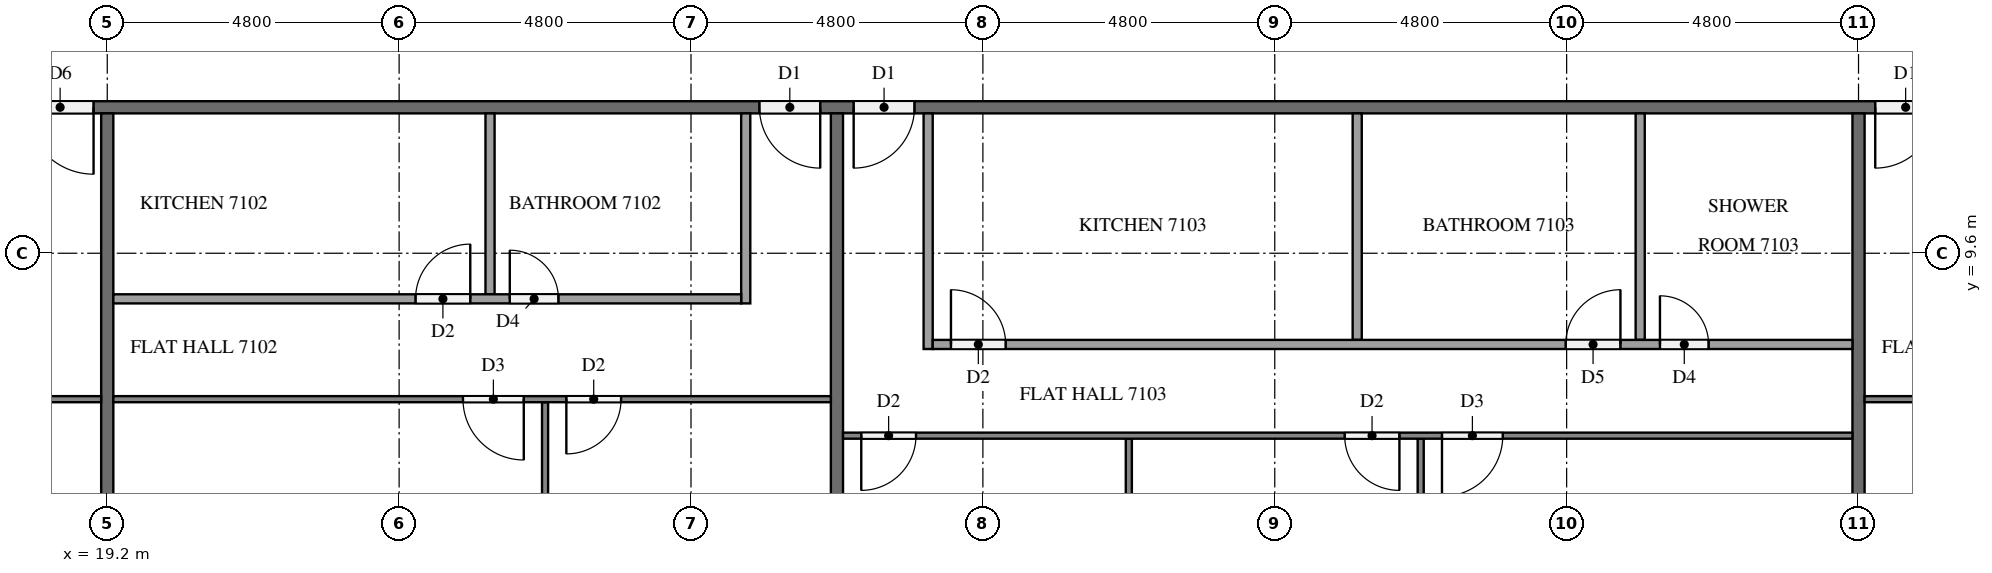
"""IFC4 building model, lengths in metres.
Left out: names, types, materials, properties, quantities, classifications, styles, units other than length and angle.
Written with IfcOpenShell. Run it as: python <this file> out.ifc"""

import sys

from ifc_helpers import new_model, si_unit, direction, frame, frame_2d, origin, place, context, subcontext, project, spatial, rectangle, extrude, element, fill, save


model = new_model("IFC4")
c1 = context("Model", 3, precision=1e-05, world=origin(), true_north=direction((0.0, 1.0)))
c2 = subcontext(c1, "Body", "Model", "MODEL_VIEW")
j1 = project(units=[si_unit("LENGTHUNIT", "METRE"), si_unit("PLANEANGLEUNIT", "RADIAN")], contexts=[c1])
p1 = place(None, origin())
s1 = spatial("IfcSite", under=j1, at=p1, CompositionType="ELEMENT")
p2 = place(p1, origin())
s2 = spatial("IfcBuilding", under=s1, at=p2, CompositionType="ELEMENT")
p3 = place(p2, frame((0.0, 0.0, 272.1)))
s3 = spatial("IfcBuildingStorey", under=s2, at=p3, CompositionType="ELEMENT", Elevation=272.1)
p4 = place(p3, frame((50.5, 12.0, 0.0), z_axis=(0.0, 0.0, 1.0), x_axis=(-1.0, 0.0, 0.0)))
e1 = element("IfcWall", 1, at=p4, inside=s3, PredefinedType="PARTITIONING", context=c2, shape_type="SweptSolid", body=[
    extrude(rectangle(XDim=38.6, YDim=0.2, at=frame_2d((19.3, 0.0))), origin(), (0.0, 0.0, 1.0), 3.2),
])
p5 = place(p4, frame((31.525, 0.0, 0.0)))
e2 = element("IfcOpeningElement", 2, at=p5, cuts=e1, PredefinedType="OPENING", context=c2, shape_type="SweptSolid", body=[
    extrude(rectangle(XDim=1.1, YDim=2.1, at=frame_2d((0.55, 1.05))), frame((0.0, 0.11, 0.0), z_axis=(0.0, -1.0, 0.0), x_axis=(1.0, 0.0, 0.0)), (0.0, 0.0, 1.0), 0.22),
])
p6 = place(p4, frame((19.575, 0.0, 0.0)))
e3 = element("IfcOpeningElement", 3, at=p6, cuts=e1, PredefinedType="OPENING", context=c2, shape_type="SweptSolid", body=[
    extrude(rectangle(XDim=1.0, YDim=2.1, at=frame_2d((0.5, 1.05))), frame((0.0, 0.11, 0.0), z_axis=(0.0, -1.0, 0.0), x_axis=(1.0, 0.0, 0.0)), (0.0, 0.0, 1.0), 0.22),
])
p7 = place(p4, frame((18.025, 0.0, 0.0)))
e4 = element("IfcOpeningElement", 4, at=p7, cuts=e1, PredefinedType="OPENING", context=c2, shape_type="SweptSolid", body=[
    extrude(rectangle(XDim=1.0, YDim=2.1, at=frame_2d((0.5, 1.05))), frame((0.0, 0.11, 0.0), z_axis=(0.0, -1.0, 0.0), x_axis=(1.0, 0.0, 0.0)), (0.0, 0.0, 1.0), 0.22),
])
p8 = place(p4, frame((1.225, 0.0, 0.0)))
e5 = element("IfcOpeningElement", 5, at=p8, cuts=e1, PredefinedType="OPENING", context=c2, shape_type="SweptSolid", body=[
    extrude(rectangle(XDim=1.0, YDim=2.1, at=frame_2d((0.5, 1.05))), frame((0.0, 0.11, 0.0), z_axis=(0.0, -1.0, 0.0), x_axis=(1.0, 0.0, 0.0)), (0.0, 0.0, 1.0), 0.22),
])
for number, where, z_axis, x_axis in (
    (6, (19.2, 11.9, 0.0), (0.0, 0.0, 1.0), (0.0, -1.0, 0.0)),
    (7, (31.2, 11.9, 0.0), (0.0, 0.0, 1.0), (0.0, -1.0, 0.0)),
    (8, (48.0, 11.9, 0.0), (0.0, 0.0, 1.0), (0.0, -1.0, 0.0)),
):
    element("IfcWall", number, at=place(p3, frame(where, z_axis=z_axis, x_axis=x_axis)), inside=s3, PredefinedType="PARTITIONING", context=c2, shape_type="SweptSolid", body=[
        extrude(rectangle(XDim=11.8, YDim=0.2, at=frame_2d((5.9, 0.0))), origin(), (0.0, 0.0, 1.0), 3.2),
    ])
p9 = place(p3, frame((19.1, 7.2, 0.0), z_axis=(0.0, 0.0, 1.0), x_axis=(-1.0, 0.0, 0.0)))
e9 = element("IfcWall", 9, at=p9, inside=s3, PredefinedType="PARTITIONING", context=c2, shape_type="SweptSolid", body=[
    extrude(rectangle(XDim=19.0, YDim=0.1, at=frame_2d((9.5, 0.0))), origin(), (0.0, 0.0, 1.0), 3.2),
])
p10 = place(p9, frame((3.45, 0.0, 0.0)))
e10 = element("IfcOpeningElement", 10, at=p10, cuts=e9, PredefinedType="OPENING", context=c2, shape_type="SweptSolid", body=[
    extrude(rectangle(XDim=0.9, YDim=2.1, at=frame_2d((0.45, 1.05))), frame((0.0, 0.06, 0.0), z_axis=(0.0, -1.0, 0.0), x_axis=(1.0, 0.0, 0.0)), (0.0, 0.0, 1.0), 0.12),
])
p11 = place(p9, frame((5.05, 0.0, 0.0)))
e11 = element("IfcOpeningElement", 11, at=p11, cuts=e9, PredefinedType="OPENING", context=c2, shape_type="SweptSolid", body=[
    extrude(rectangle(XDim=0.9, YDim=2.1, at=frame_2d((0.45, 1.05))), frame((0.0, 0.06, 0.0), z_axis=(0.0, -1.0, 0.0), x_axis=(1.0, 0.0, 0.0)), (0.0, 0.0, 1.0), 0.12),
])
p12 = place(p9, frame((13.05, 0.0, 0.0)))
e12 = element("IfcOpeningElement", 12, at=p12, cuts=e9, PredefinedType="OPENING", context=c2, shape_type="SweptSolid", body=[
    extrude(rectangle(XDim=0.9, YDim=2.1, at=frame_2d((0.45, 1.05))), frame((0.0, 0.06, 0.0), z_axis=(0.0, -1.0, 0.0), x_axis=(1.0, 0.0, 0.0)), (0.0, 0.0, 1.0), 0.12),
])
p13 = place(p9, frame((14.65, 0.0, 0.0)))
e13 = element("IfcOpeningElement", 13, at=p13, cuts=e9, PredefinedType="OPENING", context=c2, shape_type="SweptSolid", body=[
    extrude(rectangle(XDim=1.0, YDim=2.1, at=frame_2d((0.5, 1.05))), frame((0.0, 0.06, 0.0), z_axis=(0.0, -1.0, 0.0), x_axis=(1.0, 0.0, 0.0)), (0.0, 0.0, 1.0), 0.12),
])
p14 = place(p3, frame((26.4, 7.15, 0.0), z_axis=(0.0, 0.0, 1.0), x_axis=(0.0, -1.0, 0.0)))
e14 = element("IfcWall", 14, at=p14, inside=s3, PredefinedType="PARTITIONING", context=c2, shape_type="SweptSolid", body=[
    extrude(rectangle(XDim=7.05, YDim=0.1, at=frame_2d((3.525, 0.0))), origin(), (0.0, 0.0, 1.0), 3.2),
])
p15 = place(p3, frame((31.1, 7.2, 0.0), z_axis=(0.0, 0.0, 1.0), x_axis=(-1.0, 0.0, 0.0)))
e15 = element("IfcWall", 15, at=p15, inside=s3, PredefinedType="PARTITIONING", context=c2, shape_type="SweptSolid", body=[
    extrude(rectangle(XDim=11.8, YDim=0.1, at=frame_2d((5.9, 0.0))), origin(), (0.0, 0.0, 1.0), 3.2),
])
p16 = place(p15, frame((3.45, 0.0, 0.0)))
e16 = element("IfcOpeningElement", 16, at=p16, cuts=e15, PredefinedType="OPENING", context=c2, shape_type="SweptSolid", body=[
    extrude(rectangle(XDim=0.9, YDim=2.1, at=frame_2d((0.45, 1.05))), frame((0.0, 0.06, 0.0), z_axis=(0.0, -1.0, 0.0), x_axis=(1.0, 0.0, 0.0)), (0.0, 0.0, 1.0), 0.12),
])
p17 = place(p15, frame((5.05, 0.0, 0.0)))
e17 = element("IfcOpeningElement", 17, at=p17, cuts=e15, PredefinedType="OPENING", context=c2, shape_type="SweptSolid", body=[
    extrude(rectangle(XDim=1.0, YDim=2.1, at=frame_2d((0.5, 1.05))), frame((0.0, 0.06, 0.0), z_axis=(0.0, -1.0, 0.0), x_axis=(1.0, 0.0, 0.0)), (0.0, 0.0, 1.0), 0.12),
])
p18 = place(p3, frame((25.495, 11.9, 0.0), z_axis=(0.0, 0.0, 1.0), x_axis=(0.0, -1.0, 0.0)))
e18 = element("IfcWall", 18, at=p18, inside=s3, PredefinedType="PARTITIONING", context=c2, shape_type="SweptSolid", body=[
    extrude(rectangle(XDim=2.975, YDim=0.15, at=frame_2d((1.487, 0.0))), origin(), (0.0, 0.0, 1.0), 3.2),
])
p19 = place(p3, frame((29.7, 11.9, 0.0), z_axis=(0.0, 0.0, 1.0), x_axis=(0.0, -1.0, 0.0)))
e19 = element("IfcWall", 19, at=p19, inside=s3, PredefinedType="PARTITIONING", context=c2, shape_type="SweptSolid", body=[
    extrude(rectangle(XDim=3.125, YDim=0.15, at=frame_2d((1.562, 0.0))), origin(), (0.0, 0.0, 1.0), 3.2),
])
p20 = place(p3, frame((19.3, 8.85, 0.0), z_axis=(0.0, 0.0, 1.0), x_axis=(1.0, 0.0, 0.0)))
e20 = element("IfcWall", 20, at=p20, inside=s3, PredefinedType="PARTITIONING", context=c2, shape_type="SweptSolid", body=[
    extrude(rectangle(XDim=10.325, YDim=0.15, at=frame_2d((5.163, 0.0))), origin(), (0.0, 0.0, 1.0), 3.2),
])
p21 = place(p20, frame((6.52, 0.0, 0.0)))
e21 = element("IfcOpeningElement", 21, at=p21, cuts=e20, PredefinedType="OPENING", context=c2, shape_type="SweptSolid", body=[
    extrude(rectangle(XDim=0.8, YDim=2.1, at=frame_2d((0.4, 1.05))), frame((0.0, 0.085, 0.0), z_axis=(0.0, -1.0, 0.0), x_axis=(1.0, 0.0, 0.0)), (0.0, 0.0, 1.0), 0.17),
])
p22 = place(p20, frame((4.97, 0.0, 0.0)))
e22 = element("IfcOpeningElement", 22, at=p22, cuts=e20, PredefinedType="OPENING", context=c2, shape_type="SweptSolid", body=[
    extrude(rectangle(XDim=0.9, YDim=2.1, at=frame_2d((0.45, 1.05))), frame((0.0, 0.085, 0.0), z_axis=(0.0, -1.0, 0.0), x_axis=(1.0, 0.0, 0.0)), (0.0, 0.0, 1.0), 0.17),
])
for number, where, z_axis, x_axis in (
    (23, (36.0, 6.55, 0.0), (0.0, 0.0, 1.0), (0.0, -1.0, 0.0)),
    (24, (40.8, 6.55, 0.0), (0.0, 0.0, 1.0), (0.0, -1.0, 0.0)),
):
    element("IfcWall", number, at=place(p3, frame(where, z_axis=z_axis, x_axis=x_axis)), inside=s3, PredefinedType="PARTITIONING", context=c2, shape_type="SweptSolid", body=[
        extrude(rectangle(XDim=6.45, YDim=0.1, at=frame_2d((3.225, 0.0))), origin(), (0.0, 0.0, 1.0), 3.2),
    ])
p23 = place(p3, frame((47.9, 6.6, 0.0), z_axis=(0.0, 0.0, 1.0), x_axis=(-1.0, 0.0, 0.0)))
e25 = element("IfcWall", 25, at=p23, inside=s3, PredefinedType="PARTITIONING", context=c2, shape_type="SweptSolid", body=[
    extrude(rectangle(XDim=16.6, YDim=0.1, at=frame_2d((8.3, 0.0))), origin(), (0.0, 0.0, 1.0), 3.2),
])
p24 = place(p23, frame((15.4, 0.0, 0.0)))
e26 = element("IfcOpeningElement", 26, at=p24, cuts=e25, PredefinedType="OPENING", context=c2, shape_type="SweptSolid", body=[
    extrude(rectangle(XDim=0.9, YDim=2.1, at=frame_2d((0.45, 1.05))), frame((0.0, 0.06, 0.0), z_axis=(0.0, -1.0, 0.0), x_axis=(1.0, 0.0, 0.0)), (0.0, 0.0, 1.0), 0.12),
])
p25 = place(p23, frame((7.45, 0.0, 0.0)))
e27 = element("IfcOpeningElement", 27, at=p25, cuts=e25, PredefinedType="OPENING", context=c2, shape_type="SweptSolid", body=[
    extrude(rectangle(XDim=0.9, YDim=2.1, at=frame_2d((0.45, 1.05))), frame((0.0, 0.06, 0.0), z_axis=(0.0, -1.0, 0.0), x_axis=(1.0, 0.0, 0.0)), (0.0, 0.0, 1.0), 0.12),
])
p26 = place(p23, frame((5.75, 0.0, 0.0)))
e28 = element("IfcOpeningElement", 28, at=p26, cuts=e25, PredefinedType="OPENING", context=c2, shape_type="SweptSolid", body=[
    extrude(rectangle(XDim=1.0, YDim=2.1, at=frame_2d((0.5, 1.05))), frame((0.0, 0.06, 0.0), z_axis=(0.0, -1.0, 0.0), x_axis=(1.0, 0.0, 0.0)), (0.0, 0.0, 1.0), 0.12),
])
for number, where, z_axis, x_axis in (
    (29, (39.756, 11.9, 0.0), (0.0, 0.0, 1.0), (0.0, -1.0, 0.0)),
    (30, (44.41, 11.9, 0.0), (0.0, 0.0, 1.0), (0.0, -1.0, 0.0)),
):
    element("IfcWall", number, at=place(p3, frame(where, z_axis=z_axis, x_axis=x_axis)), inside=s3, PredefinedType="PARTITIONING", context=c2, shape_type="SweptSolid", body=[
        extrude(rectangle(XDim=3.725, YDim=0.15, at=frame_2d((1.862, 0.0))), origin(), (0.0, 0.0, 1.0), 3.2),
    ])
p27 = place(p3, frame((32.7, 11.9, 0.0), z_axis=(0.0, 0.0, 1.0), x_axis=(0.0, -1.0, 0.0)))
e31 = element("IfcWall", 31, at=p27, inside=s3, PredefinedType="PARTITIONING", context=c2, shape_type="SweptSolid", body=[
    extrude(rectangle(XDim=3.875, YDim=0.15, at=frame_2d((1.938, 0.0))), origin(), (0.0, 0.0, 1.0), 3.2),
])
p28 = place(p3, frame((32.775, 8.1, 0.0), z_axis=(0.0, 0.0, 1.0), x_axis=(1.0, 0.0, 0.0)))
e32 = element("IfcWall", 32, at=p28, inside=s3, PredefinedType="PARTITIONING", context=c2, shape_type="SweptSolid", body=[
    extrude(rectangle(XDim=15.125, YDim=0.15, at=frame_2d((7.562, 0.0))), origin(), (0.0, 0.0, 1.0), 3.2),
])
p29 = place(p28, frame((0.3, 0.0, 0.0)))
e33 = element("IfcOpeningElement", 33, at=p29, cuts=e32, PredefinedType="OPENING", context=c2, shape_type="SweptSolid", body=[
    extrude(rectangle(XDim=0.9, YDim=2.1, at=frame_2d((0.45, 1.05))), frame((0.0, 0.085, 0.0), z_axis=(0.0, -1.0, 0.0), x_axis=(1.0, 0.0, 0.0)), (0.0, 0.0, 1.0), 0.17),
])
p30 = place(p28, frame((10.41, 0.0, 0.0)))
e34 = element("IfcOpeningElement", 34, at=p30, cuts=e32, PredefinedType="OPENING", context=c2, shape_type="SweptSolid", body=[
    extrude(rectangle(XDim=0.9, YDim=2.1, at=frame_2d((0.45, 1.05))), frame((0.0, 0.085, 0.0), z_axis=(0.0, -1.0, 0.0), x_axis=(1.0, 0.0, 0.0)), (0.0, 0.0, 1.0), 0.17),
])
p31 = place(p28, frame((11.96, 0.0, 0.0)))
e35 = element("IfcOpeningElement", 35, at=p31, cuts=e32, PredefinedType="OPENING", context=c2, shape_type="SweptSolid", body=[
    extrude(rectangle(XDim=0.8, YDim=2.1, at=frame_2d((0.4, 1.05))), frame((0.0, 0.085, 0.0), z_axis=(0.0, -1.0, 0.0), x_axis=(1.0, 0.0, 0.0)), (0.0, 0.0, 1.0), 0.17),
])
p32 = place(p3, frame((57.5, 7.2, 0.0), z_axis=(0.0, 0.0, 1.0), x_axis=(-1.0, 0.0, 0.0)))
e36 = element("IfcWall", 36, at=p32, inside=s3, PredefinedType="PARTITIONING", context=c2, shape_type="SweptSolid", body=[
    extrude(rectangle(XDim=9.4, YDim=0.1, at=frame_2d((4.7, 0.0))), origin(), (0.0, 0.0, 1.0), 3.2),
])
p33 = place(p32, frame((5.05, 0.0, 0.0)))
e37 = element("IfcOpeningElement", 37, at=p33, cuts=e36, PredefinedType="OPENING", context=c2, shape_type="SweptSolid", body=[
    extrude(rectangle(XDim=1.0, YDim=2.1, at=frame_2d((0.5, 1.05))), frame((0.0, 0.06, 0.0), z_axis=(0.0, -1.0, 0.0), x_axis=(1.0, 0.0, 0.0)), (0.0, 0.0, 1.0), 0.12),
])
p34 = place(p32, frame((3.45, 0.0, 0.0)))
e38 = element("IfcOpeningElement", 38, at=p34, cuts=e36, PredefinedType="OPENING", context=c2, shape_type="SweptSolid", body=[
    extrude(rectangle(XDim=0.9, YDim=2.1, at=frame_2d((0.45, 1.05))), frame((0.0, 0.06, 0.0), z_axis=(0.0, -1.0, 0.0), x_axis=(1.0, 0.0, 0.0)), (0.0, 0.0, 1.0), 0.12),
])
p35 = place(p5, origin())
e39 = element("IfcDoor", 39, at=p35, inside=s3, OperationType="SINGLE_SWING_LEFT", PredefinedType="DOOR", context=c2, shape_type="SweptSolid", body=[
    extrude(rectangle(XDim=1.1, YDim=2.1, at=frame_2d((0.55, 1.05))), frame((0.0, 0.025, 0.0), z_axis=(0.0, -1.0, 0.0), x_axis=(1.0, 0.0, 0.0)), (0.0, 0.0, 1.0), 0.05),
])
fill(e2, e39)
p36 = place(p6, origin())
e40 = element("IfcDoor", 40, at=p36, inside=s3, OperationType="SINGLE_SWING_LEFT", PredefinedType="DOOR", context=c2, shape_type="SweptSolid", body=[
    extrude(rectangle(XDim=1.0, YDim=2.1, at=frame_2d((0.5, 1.05))), frame((0.0, 0.025, 0.0), z_axis=(0.0, -1.0, 0.0), x_axis=(1.0, 0.0, 0.0)), (0.0, 0.0, 1.0), 0.05),
])
fill(e3, e40)
p37 = place(p7, origin())
e41 = element("IfcDoor", 41, at=p37, inside=s3, OperationType="SINGLE_SWING_RIGHT", PredefinedType="DOOR", context=c2, shape_type="SweptSolid", body=[
    extrude(rectangle(XDim=1.0, YDim=2.1, at=frame_2d((0.5, 1.05))), frame((0.0, 0.025, 0.0), z_axis=(0.0, -1.0, 0.0), x_axis=(1.0, 0.0, 0.0)), (0.0, 0.0, 1.0), 0.05),
])
fill(e4, e41)
p38 = place(p8, origin())
e42 = element("IfcDoor", 42, at=p38, inside=s3, OperationType="SINGLE_SWING_RIGHT", PredefinedType="DOOR", context=c2, shape_type="SweptSolid", body=[
    extrude(rectangle(XDim=1.0, YDim=2.1, at=frame_2d((0.5, 1.05))), frame((0.0, 0.025, 0.0), z_axis=(0.0, -1.0, 0.0), x_axis=(1.0, 0.0, 0.0)), (0.0, 0.0, 1.0), 0.05),
])
fill(e5, e42)
p39 = place(p16, origin())
e43 = element("IfcDoor", 43, at=p39, inside=s3, OperationType="SINGLE_SWING_RIGHT", PredefinedType="DOOR", context=c2, shape_type="SweptSolid", body=[
    extrude(rectangle(XDim=0.9, YDim=2.1, at=frame_2d((0.45, 1.05))), frame((0.0, 0.025, 0.0), z_axis=(0.0, -1.0, 0.0), x_axis=(1.0, 0.0, 0.0)), (0.0, 0.0, 1.0), 0.05),
])
fill(e16, e43)
p40 = place(p17, origin())
e44 = element("IfcDoor", 44, at=p40, inside=s3, OperationType="SINGLE_SWING_LEFT", PredefinedType="DOOR", context=c2, shape_type="SweptSolid", body=[
    extrude(rectangle(XDim=1.0, YDim=2.1, at=frame_2d((0.5, 1.05))), frame((0.0, 0.025, 0.0), z_axis=(0.0, -1.0, 0.0), x_axis=(1.0, 0.0, 0.0)), (0.0, 0.0, 1.0), 0.05),
])
fill(e17, e44)
p41 = place(p21, origin())
e45 = element("IfcDoor", 45, at=p41, inside=s3, OperationType="SINGLE_SWING_LEFT", PredefinedType="DOOR", context=c2, shape_type="SweptSolid", body=[
    extrude(rectangle(XDim=0.8, YDim=2.1, at=frame_2d((0.4, 1.05))), frame((0.0, 0.025, 0.0), z_axis=(0.0, -1.0, 0.0), x_axis=(1.0, 0.0, 0.0)), (0.0, 0.0, 1.0), 0.05),
])
fill(e21, e45)
p42 = place(p22, origin())
e46 = element("IfcDoor", 46, at=p42, inside=s3, OperationType="SINGLE_SWING_RIGHT", PredefinedType="DOOR", context=c2, shape_type="SweptSolid", body=[
    extrude(rectangle(XDim=0.9, YDim=2.1, at=frame_2d((0.45, 1.05))), frame((0.0, 0.025, 0.0), z_axis=(0.0, -1.0, 0.0), x_axis=(1.0, 0.0, 0.0)), (0.0, 0.0, 1.0), 0.05),
])
fill(e22, e46)
p43 = place(p24, origin())
e47 = element("IfcDoor", 47, at=p43, inside=s3, OperationType="SINGLE_SWING_RIGHT", PredefinedType="DOOR", context=c2, shape_type="SweptSolid", body=[
    extrude(rectangle(XDim=0.9, YDim=2.1, at=frame_2d((0.45, 1.05))), frame((0.0, 0.025, 0.0), z_axis=(0.0, -1.0, 0.0), x_axis=(1.0, 0.0, 0.0)), (0.0, 0.0, 1.0), 0.05),
])
fill(e26, e47)
p44 = place(p25, origin())
e48 = element("IfcDoor", 48, at=p44, inside=s3, OperationType="SINGLE_SWING_LEFT", PredefinedType="DOOR", context=c2, shape_type="SweptSolid", body=[
    extrude(rectangle(XDim=0.9, YDim=2.1, at=frame_2d((0.45, 1.05))), frame((0.0, 0.025, 0.0), z_axis=(0.0, -1.0, 0.0), x_axis=(1.0, 0.0, 0.0)), (0.0, 0.0, 1.0), 0.05),
])
fill(e27, e48)
p45 = place(p26, origin())
e49 = element("IfcDoor", 49, at=p45, inside=s3, OperationType="SINGLE_SWING_RIGHT", PredefinedType="DOOR", context=c2, shape_type="SweptSolid", body=[
    extrude(rectangle(XDim=1.0, YDim=2.1, at=frame_2d((0.5, 1.05))), frame((0.0, 0.025, 0.0), z_axis=(0.0, -1.0, 0.0), x_axis=(1.0, 0.0, 0.0)), (0.0, 0.0, 1.0), 0.05),
])
fill(e28, e49)
p46 = place(p29, origin())
e50 = element("IfcDoor", 50, at=p46, inside=s3, OperationType="SINGLE_SWING_LEFT", PredefinedType="DOOR", context=c2, shape_type="SweptSolid", body=[
    extrude(rectangle(XDim=0.9, YDim=2.1, at=frame_2d((0.45, 1.05))), frame((0.0, 0.025, 0.0), z_axis=(0.0, -1.0, 0.0), x_axis=(1.0, 0.0, 0.0)), (0.0, 0.0, 1.0), 0.05),
])
fill(e33, e50)
p47 = place(p30, origin())
e51 = element("IfcDoor", 51, at=p47, inside=s3, OperationType="SINGLE_SWING_RIGHT", PredefinedType="DOOR", context=c2, shape_type="SweptSolid", body=[
    extrude(rectangle(XDim=0.9, YDim=2.1, at=frame_2d((0.45, 1.05))), frame((0.0, 0.025, 0.0), z_axis=(0.0, -1.0, 0.0), x_axis=(1.0, 0.0, 0.0)), (0.0, 0.0, 1.0), 0.05),
])
fill(e34, e51)
p48 = place(p31, origin())
e52 = element("IfcDoor", 52, at=p48, inside=s3, OperationType="SINGLE_SWING_LEFT", PredefinedType="DOOR", context=c2, shape_type="SweptSolid", body=[
    extrude(rectangle(XDim=0.8, YDim=2.1, at=frame_2d((0.4, 1.05))), frame((0.0, 0.025, 0.0), z_axis=(0.0, -1.0, 0.0), x_axis=(1.0, 0.0, 0.0)), (0.0, 0.0, 1.0), 0.05),
])
fill(e35, e52)
save(model, sys.argv[1])
